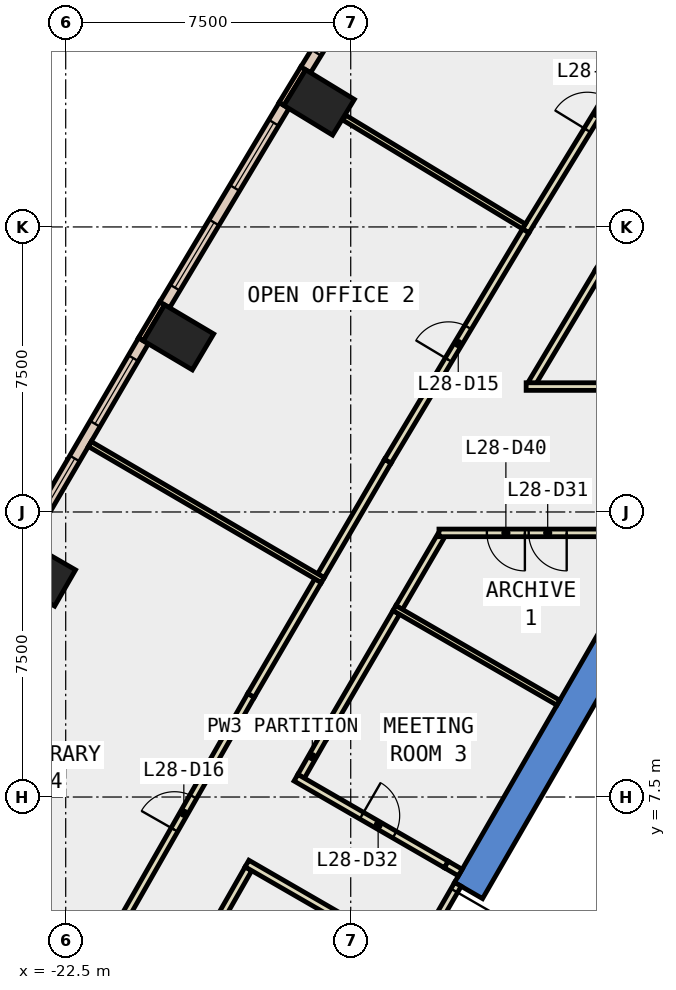
"""IFC4 building model, lengths in metres.
Left out: names, types, materials, properties, quantities, classifications, styles, units other than length and angle.
Written with IfcOpenShell. Run it as: python <this file> out.ifc"""

import sys

from ifc_helpers import new_model, si_unit, direction, frame, frame_2d, origin, origin_2d, place, context, subcontext, project, spatial, polyline, rectangle, outline, extrude, element, fill, save


model = new_model("IFC4")
c1 = context("Model", 3, precision=1e-05, world=origin(), true_north=direction((0.0, 1.0)))
c2 = subcontext(c1, "Body", "Model", "MODEL_VIEW")
j1 = project(units=[si_unit("LENGTHUNIT", "METRE"), si_unit("PLANEANGLEUNIT", "RADIAN")], contexts=[c1])
p1 = place(None, origin())
s1 = spatial("IfcSite", under=j1, at=p1, CompositionType="ELEMENT")
p2 = place(p1, origin())
s2 = spatial("IfcBuilding", under=s1, at=p2, CompositionType="ELEMENT")
p3 = place(p2, frame((0.0, 0.0, 128.6)))
s3 = spatial("IfcBuildingStorey", under=s2, at=p3, CompositionType="ELEMENT", Elevation=128.6)
for number, where, z_axis, x_axis in (
    (1, (-15.831, 25.776, -0.4), (0.0, 0.0, 1.0), (0.52, 0.854, 0.0)),
    (2, (-19.532, 19.595, -0.4), (0.0, 0.0, 1.0), (0.51, 0.86, 0.0)),
    (3, (-23.166, 13.375, -0.4), (0.0, 0.0, 1.0), (0.5, 0.866, 0.0)),
):
    element("IfcColumn", number, at=place(p3, frame(where, z_axis=z_axis, x_axis=x_axis)), inside=s3, PredefinedType="COLUMN", context=c2, shape_type="SweptSolid", body=[
        extrude(rectangle(XDim=1.1, YDim=1.5, at=origin_2d()), origin(), (0.0, 0.0, 1.0), 4.0),
    ])
p4 = place(p3, frame((0.0, 0.0, -0.4)))
e4 = element("IfcWall", 4, at=p4, inside=s3, PredefinedType="SHEAR", context=c2, shape_type="SweptSolid", body=[
    extrude(outline(polyline([(-12.267, 5.252), (-11.531, 4.827), (-6.437, 13.65), (-6.928, 14.5), (-12.267, 5.252)])), origin(), (0.0, 0.0, 1.0), 4.0),
])
p5 = place(p3, frame((-16.25, 26.675, 0.0), z_axis=(0.0, 0.0, 1.0), x_axis=(-0.519869515594, -0.854245682901, 0.0)))
e5 = element("IfcWall", 5, at=p5, inside=s3, PredefinedType="STANDARD", context=c2, shape_type="SweptSolid", body=[
    extrude(rectangle(XDim=1.1, YDim=0.15, at=frame_2d((0.55, 0.0))), origin(), (0.0, 0.0, 1.0), 3.6),
])
p6 = place(p3, frame((-19.961, 20.489, 0.0), z_axis=(0.0, 0.0, 1.0), x_axis=(-0.510082245696, -0.860125631885, 0.0)))
e6 = element("IfcWall", 6, at=p6, inside=s3, PredefinedType="STANDARD", context=c2, shape_type="SweptSolid", body=[
    extrude(rectangle(XDim=1.1, YDim=0.15, at=frame_2d((0.55, 0.0))), origin(), (0.0, 0.0, 1.0), 3.6),
])
p7 = place(p3, frame((-12.989, 31.846, 0.0), z_axis=(0.0, 0.0, 1.0), x_axis=(-0.522757750181, -0.8524812811, 0.0)))
e7 = element("IfcWall", 7, at=p7, inside=s3, PredefinedType="STANDARD", context=c2, shape_type="SweptSolid", body=[
    extrude(rectangle(XDim=6.114, YDim=0.3, at=frame_2d((3.057, 0.0))), origin(), (0.0, 0.0, 1.0), 3.6),
])
p8 = place(p7, frame((0.528, 0.0, 0.9)))
e8 = element("IfcOpeningElement", 8, at=p8, cuts=e7, PredefinedType="OPENING", context=c2, shape_type="SweptSolid", body=[
    extrude(rectangle(XDim=2.0, YDim=2.6, at=frame_2d((1.0, 1.3))), frame((0.0, 0.16, 0.0), z_axis=(0.0, -1.0, 0.0), x_axis=(1.0, 0.0, 0.0)), (0.0, 0.0, 1.0), 0.32),
])
p9 = place(p7, frame((3.585, 0.0, 0.9)))
e9 = element("IfcOpeningElement", 9, at=p9, cuts=e7, PredefinedType="OPENING", context=c2, shape_type="SweptSolid", body=[
    extrude(rectangle(XDim=2.0, YDim=2.6, at=frame_2d((1.0, 1.3))), frame((0.0, 0.16, 0.0), z_axis=(0.0, -1.0, 0.0), x_axis=(1.0, 0.0, 0.0)), (0.0, 0.0, 1.0), 0.32),
])
p10 = place(p3, frame((-16.754, 25.695, 0.0), z_axis=(0.0, 0.0, 1.0), x_axis=(-0.513708729904, -0.857964650099, 0.0)))
e10 = element("IfcWall", 10, at=p10, inside=s3, PredefinedType="STANDARD", context=c2, shape_type="SweptSolid", body=[
    extrude(rectangle(XDim=6.115, YDim=0.3, at=frame_2d((3.057, 0.0))), origin(), (0.0, 0.0, 1.0), 3.6),
])
p11 = place(p10, frame((0.529, 0.0, 0.9)))
e11 = element("IfcOpeningElement", 11, at=p11, cuts=e10, PredefinedType="OPENING", context=c2, shape_type="SweptSolid", body=[
    extrude(rectangle(XDim=2.0, YDim=2.6, at=frame_2d((1.0, 1.3))), frame((0.0, 0.16, 0.0), z_axis=(0.0, -1.0, 0.0), x_axis=(1.0, 0.0, 0.0)), (0.0, 0.0, 1.0), 0.32),
])
p12 = place(p10, frame((3.586, 0.0, 0.9)))
e12 = element("IfcOpeningElement", 12, at=p12, cuts=e10, PredefinedType="OPENING", context=c2, shape_type="SweptSolid", body=[
    extrude(rectangle(XDim=2.0, YDim=2.6, at=frame_2d((1.0, 1.3))), frame((0.0, 0.16, 0.0), z_axis=(0.0, -1.0, 0.0), x_axis=(1.0, 0.0, 0.0)), (0.0, 0.0, 1.0), 0.32),
])
p13 = place(p3, frame((-20.454, 19.503, 0.0), z_axis=(0.0, 0.0, 1.0), x_axis=(-0.504441987427, -0.863445586775, 0.0)))
e13 = element("IfcWall", 13, at=p13, inside=s3, PredefinedType="STANDARD", context=c2, shape_type="SweptSolid", body=[
    extrude(rectangle(XDim=6.114, YDim=0.3, at=frame_2d((3.057, 0.0))), origin(), (0.0, 0.0, 1.0), 3.6),
])
p14 = place(p13, frame((0.528, 0.0, 0.9)))
e14 = element("IfcOpeningElement", 14, at=p14, cuts=e13, PredefinedType="OPENING", context=c2, shape_type="SweptSolid", body=[
    extrude(rectangle(XDim=2.0, YDim=2.6, at=frame_2d((1.0, 1.3))), frame((0.0, 0.16, 0.0), z_axis=(0.0, -1.0, 0.0), x_axis=(1.0, 0.0, 0.0)), (0.0, 0.0, 1.0), 0.32),
])
p15 = place(p13, frame((3.585, 0.0, 0.9)))
e15 = element("IfcOpeningElement", 15, at=p15, cuts=e13, PredefinedType="OPENING", context=c2, shape_type="SweptSolid", body=[
    extrude(rectangle(XDim=2.0, YDim=2.6, at=frame_2d((1.0, 1.3))), frame((0.0, 0.16, 0.0), z_axis=(0.0, -1.0, 0.0), x_axis=(1.0, 0.0, 0.0)), (0.0, 0.0, 1.0), 0.32),
])
p16 = place(p3, frame((-12.628, 14.364, 0.0), z_axis=(0.0, 0.0, 1.0), x_axis=(-0.504457175129, -0.863436713639, 0.0)))
e16 = element("IfcWall", 16, at=p16, inside=s3, PredefinedType="PARTITIONING", context=c2, shape_type="SweptSolid", body=[
    extrude(rectangle(XDim=2.175, YDim=0.2, at=frame_2d((1.087, 0.0))), origin(), (0.0, 0.0, 1.0), 3.6),
])
p17 = place(p3, frame((-13.801, 12.356, 0.0), z_axis=(0.0, 0.0, 1.0), x_axis=(-0.504282474222, -0.863538757782, 0.0)))
e17 = element("IfcWall", 17, at=p17, inside=s3, PredefinedType="PARTITIONING", context=c2, shape_type="SweptSolid", body=[
    extrude(rectangle(XDim=3.8, YDim=0.2, at=frame_2d((1.9, 0.0))), origin(), (0.0, 0.0, 1.0), 3.6),
])
p18 = place(p3, frame((-15.717, 9.075, 0.0), z_axis=(0.0, 0.0, 1.0), x_axis=(-0.495695496657, -0.868496387208, 0.0)))
e18 = element("IfcWall", 18, at=p18, inside=s3, PredefinedType="PARTITIONING", context=c2, shape_type="SweptSolid", body=[
    extrude(rectangle(XDim=1.186, YDim=0.2, at=frame_2d((0.593, 0.0))), origin(), (0.0, 0.0, 1.0), 3.6),
])
p19 = place(p3, frame((-16.441, 8.008, 0.0), z_axis=(0.0, 0.0, 1.0), x_axis=(0.866020923391, -0.500007760188, 0.0)))
e19 = element("IfcWall", 19, at=p19, inside=s3, PredefinedType="PARTITIONING", context=c2, shape_type="SweptSolid", body=[
    extrude(rectangle(XDim=4.568, YDim=0.2, at=frame_2d((2.284, 0.0))), origin(), (0.0, 0.0, 1.0), 3.6),
])
p20 = place(p19, frame((1.997, 0.0, 0.0)))
e20 = element("IfcOpeningElement", 20, at=p20, cuts=e19, PredefinedType="OPENING", context=c2, shape_type="SweptSolid", body=[
    extrude(rectangle(XDim=1.0, YDim=2.1, at=frame_2d((0.5, 1.05))), frame((0.0, 0.11, 0.0), z_axis=(0.0, -1.0, 0.0), x_axis=(1.0, 0.0, 0.0)), (0.0, 0.0, 1.0), 0.22),
])
p21 = place(p3, frame((-4.756, 27.386, 0.0), z_axis=(0.0, 0.0, 1.0), x_axis=(-0.522743103274, -0.852490262689, 0.0)))
e21 = element("IfcWall", 21, at=p21, inside=s3, PredefinedType="PARTITIONING", context=c2, shape_type="SweptSolid", body=[
    extrude(rectangle(XDim=7.115, YDim=0.2, at=frame_2d((3.557, 0.0))), origin(), (0.0, 0.0, 1.0), 3.6),
])
p22 = place(p21, frame((3.057, 0.0, 0.0)))
e22 = element("IfcOpeningElement", 22, at=p22, cuts=e21, PredefinedType="OPENING", context=c2, shape_type="SweptSolid", body=[
    extrude(rectangle(XDim=1.0, YDim=2.1, at=frame_2d((0.5, 1.05))), frame((0.0, 0.11, 0.0), z_axis=(0.0, -1.0, 0.0), x_axis=(1.0, 0.0, 0.0)), (0.0, 0.0, 1.0), 0.22),
])
p23 = place(p3, frame((-8.475, 21.321, 0.0), z_axis=(0.0, 0.0, 1.0), x_axis=(-0.513592824646, -0.858034038062, 0.0)))
e23 = element("IfcWall", 23, at=p23, inside=s3, PredefinedType="PARTITIONING", context=c2, shape_type="SweptSolid", body=[
    extrude(rectangle(XDim=3.421, YDim=0.2, at=frame_2d((1.71, 0.0))), origin(), (0.0, 0.0, 1.0), 3.6),
])
p24 = place(p3, frame((-17.692, 5.613, 0.0), z_axis=(0.0, 0.0, 1.0), x_axis=(-0.495492055461, -0.868612469963, 0.0)))
e24 = element("IfcWall", 24, at=p24, inside=s3, PredefinedType="PARTITIONING", context=c2, shape_type="SweptSolid", body=[
    extrude(rectangle(XDim=3.13, YDim=0.2, at=frame_2d((1.565, 0.0))), origin(), (0.0, 0.0, 1.0), 3.6),
])
p25 = place(p3, frame((-10.396, 22.397, 0.0), z_axis=(0.0, 0.0, 1.0), x_axis=(0.522695398968, 0.852519512913, 0.0)))
e25 = element("IfcWall", 25, at=p25, inside=s3, PredefinedType="PARTITIONING", context=c2, shape_type="SweptSolid", body=[
    extrude(rectangle(XDim=7.213, YDim=0.2, at=frame_2d((3.606, 0.0))), origin(), (0.0, 0.0, 1.0), 3.6),
])
p26 = place(p25, frame((3.106, 0.0, 0.0)))
e26 = element("IfcOpeningElement", 26, at=p26, cuts=e25, PredefinedType="OPENING", context=c2, shape_type="SweptSolid", body=[
    extrude(rectangle(XDim=1.0, YDim=2.1, at=frame_2d((0.5, 1.05))), frame((0.0, 0.11, 0.0), z_axis=(0.0, -1.0, 0.0), x_axis=(1.0, 0.0, 0.0)), (0.0, 0.0, 1.0), 0.22),
])
p27 = place(p3, frame((-15.784, 13.322, 0.0), z_axis=(0.0, 0.0, 1.0), x_axis=(0.50424043703, 0.863563304954, 0.0)))
e27 = element("IfcWall", 27, at=p27, inside=s3, PredefinedType="PARTITIONING", context=c2, shape_type="SweptSolid", body=[
    extrude(rectangle(XDim=3.492, YDim=0.2, at=frame_2d((1.746, 0.0))), origin(), (0.0, 0.0, 1.0), 3.6),
])
p28 = place(p3, frame((-14.023, 16.338, 0.0), z_axis=(0.0, 0.0, 1.0), x_axis=(0.513773581048, 0.857925816966, 0.0)))
e28 = element("IfcWall", 28, at=p28, inside=s3, PredefinedType="PARTITIONING", context=c2, shape_type="SweptSolid", body=[
    extrude(rectangle(XDim=7.061, YDim=0.2, at=frame_2d((3.531, 0.0))), origin(), (0.0, 0.0, 1.0), 3.6),
])
p29 = place(p28, frame((3.106, 0.0, 0.0)))
e29 = element("IfcOpeningElement", 29, at=p29, cuts=e28, PredefinedType="OPENING", context=c2, shape_type="SweptSolid", body=[
    extrude(rectangle(XDim=1.0, YDim=2.1, at=frame_2d((0.5, 1.05))), frame((0.0, 0.11, 0.0), z_axis=(0.0, -1.0, 0.0), x_axis=(1.0, 0.0, 0.0)), (0.0, 0.0, 1.0), 0.22),
])
p30 = place(p3, frame((-21.16, 3.974, 0.0), z_axis=(0.0, 0.0, 1.0), x_axis=(0.495450054309, 0.868636427791, 0.0)))
e30 = element("IfcWall", 30, at=p30, inside=s3, PredefinedType="PARTITIONING", context=c2, shape_type="SweptSolid", body=[
    extrude(rectangle(XDim=7.139, YDim=0.2, at=frame_2d((3.569, 0.0))), origin(), (0.0, 0.0, 1.0), 3.6),
])
p31 = place(p30, frame((3.069, 0.0, 0.0)))
e31 = element("IfcOpeningElement", 31, at=p31, cuts=e30, PredefinedType="OPENING", context=c2, shape_type="SweptSolid", body=[
    extrude(rectangle(XDim=1.0, YDim=2.1, at=frame_2d((0.5, 1.05))), frame((0.0, 0.11, 0.0), z_axis=(0.0, -1.0, 0.0), x_axis=(1.0, 0.0, 0.0)), (0.0, 0.0, 1.0), 0.22),
])
p32 = place(p3, frame((-17.623, 10.175, 0.0), z_axis=(0.0, 0.0, 1.0), x_axis=(0.504383407959, 0.863479807393, 0.0)))
e32 = element("IfcWall", 32, at=p32, inside=s3, PredefinedType="PARTITIONING", context=c2, shape_type="SweptSolid", body=[
    extrude(rectangle(XDim=3.495, YDim=0.2, at=frame_2d((1.748, 0.0))), origin(), (0.0, 0.0, 1.0), 3.6),
])
p33 = place(p3, frame((-9.537, 9.981, 0.0), z_axis=(0.0, 0.0, 1.0), x_axis=(-0.866035377451, 0.499982724704, 0.0)))
e33 = element("IfcWall", 33, at=p33, inside=s3, PredefinedType="PARTITIONING", context=c2, shape_type="SweptSolid", body=[
    extrude(rectangle(XDim=4.98, YDim=0.15, at=frame_2d((2.49, 0.0))), origin(), (0.0, 0.0, 1.0), 3.6),
])
p34 = place(p3, frame((-6.957, 14.45, 0.0), z_axis=(0.0, 0.0, 1.0), x_axis=(-1.0, 0.0, 0.0)))
e34 = element("IfcWall", 34, at=p34, inside=s3, PredefinedType="PARTITIONING", context=c2, shape_type="SweptSolid", body=[
    extrude(rectangle(XDim=5.721, YDim=0.2, at=frame_2d((2.86, 0.0))), origin(), (0.0, 0.0, 1.0), 3.6),
])
p35 = place(p34, frame((2.36, 0.0, 0.0)))
e35 = element("IfcOpeningElement", 35, at=p35, cuts=e34, PredefinedType="OPENING", context=c2, shape_type="SweptSolid", body=[
    extrude(rectangle(XDim=1.0, YDim=2.1, at=frame_2d((0.5, 1.05))), frame((0.0, 0.11, 0.0), z_axis=(0.0, -1.0, 0.0), x_axis=(1.0, 0.0, 0.0)), (0.0, 0.0, 1.0), 0.22),
])
p36 = place(p34, frame((3.46, 0.0, 0.0)))
e36 = element("IfcOpeningElement", 36, at=p36, cuts=e34, PredefinedType="OPENING", context=c2, shape_type="SweptSolid", body=[
    extrude(rectangle(XDim=1.0, YDim=2.1, at=frame_2d((0.5, 1.05))), frame((0.0, 0.11, 0.0), z_axis=(0.0, -1.0, 0.0), x_axis=(1.0, 0.0, 0.0)), (0.0, 0.0, 1.0), 0.22),
])
p37 = place(p3, frame((-10.384, 18.3, 0.0), z_axis=(0.0, 0.0, 1.0), x_axis=(1.0, 0.0, 0.0)))
e37 = element("IfcWall", 37, at=p37, inside=s3, PredefinedType="PARTITIONING", context=c2, shape_type="SweptSolid", body=[
    extrude(rectangle(XDim=9.984, YDim=0.2, at=frame_2d((4.992, 0.0))), origin(), (0.0, 0.0, 1.0), 3.6),
])
p38 = place(p3, frame((-10.442, 22.513, 0.0), z_axis=(0.0, 0.0, 1.0), x_axis=(-0.855343076014, 0.518061986943, 0.0)))
e38 = element("IfcWall", 38, at=p38, inside=s3, PredefinedType="PARTITIONING", context=c2, shape_type="SweptSolid", body=[
    extrude(rectangle(XDim=5.53, YDim=0.15, at=frame_2d((2.765, 0.0))), origin(), (0.0, 0.0, 1.0), 3.6),
])
p39 = place(p3, frame((-15.736, 13.207, 0.0), z_axis=(0.0, 0.0, 1.0), x_axis=(-0.863454426155, 0.504426856892, 0.0)))
e39 = element("IfcWall", 39, at=p39, inside=s3, PredefinedType="PARTITIONING", context=c2, shape_type="SweptSolid", body=[
    extrude(rectangle(XDim=7.099, YDim=0.15, at=frame_2d((3.55, 0.0))), origin(), (0.0, 0.0, 1.0), 3.6),
])
p40 = place(p3, frame((-12.18, 5.202, 0.0), z_axis=(0.0, 0.0, 1.0), x_axis=(-0.50002537861, -0.866010750942, 0.0)))
e40 = element("IfcWall", 40, at=p40, inside=s3, PredefinedType="PARTITIONING", context=c2, shape_type="SweptSolid", body=[
    extrude(rectangle(XDim=2.0, YDim=0.2, at=frame_2d((1.0, 0.0))), origin(), (0.0, 0.0, 1.0), 2.4),
])
p41 = place(p40, frame((0.19, 0.0, 0.0)))
e41 = element("IfcOpeningElement", 41, at=p41, cuts=e40, PredefinedType="OPENING", context=c2, shape_type="SweptSolid", body=[
    extrude(rectangle(XDim=1.8, YDim=2.1, at=frame_2d((0.9, 1.05))), frame((0.0, 0.11, 0.0), z_axis=(0.0, -1.0, 0.0), x_axis=(1.0, 0.0, 0.0)), (0.0, 0.0, 1.0), 0.22),
])
p42 = place(p3, frame((-12.485, 5.724, 0.0), z_axis=(0.0, 0.0, 1.0), x_axis=(0.866434177787, -0.499291313327, 0.0)))
e42 = element("IfcWall", 42, at=p42, inside=s3, PredefinedType="PARTITIONING", context=c2, shape_type="SweptSolid", body=[
    extrude(rectangle(XDim=0.425, YDim=0.2, at=frame_2d((0.212, 0.0))), origin(), (0.0, 0.0, 1.0), 2.4),
])
p43 = place(p3, frame((-13.785, 3.473, 0.0), z_axis=(0.0, 0.0, 1.0), x_axis=(-0.866081168121, 0.499903400895, 0.0)))
e43 = element("IfcWall", 43, at=p43, inside=s3, PredefinedType="PARTITIONING", context=c2, shape_type="SweptSolid", body=[
    extrude(rectangle(XDim=4.555, YDim=0.2, at=frame_2d((2.278, 0.0))), origin(), (0.0, 0.0, 1.0), 3.6),
])
p44 = place(p3, frame((-5.03, 9.388, 0.0), z_axis=(0.0, 0.0, 1.0), x_axis=(-0.499978703459, -0.866037698999, 0.0)))
e44 = element("IfcWall", 44, at=p44, inside=s3, PredefinedType="STANDARD", context=c2, shape_type="SweptSolid", body=[
    extrude(rectangle(XDim=6.9, YDim=0.2, at=frame_2d((3.45, 0.0))), origin(), (0.0, 0.0, 1.0), 3.6),
])
p45 = place(p9, origin())
e45 = element("IfcWindow", 45, at=p45, inside=s3, PartitioningType="SINGLE_PANEL", PredefinedType="WINDOW", context=c2, shape_type="SweptSolid", body=[
    extrude(rectangle(XDim=2.0, YDim=2.6, at=frame_2d((1.0, 1.3))), frame((0.0, 0.03, 0.0), z_axis=(0.0, -1.0, 0.0), x_axis=(1.0, 0.0, 0.0)), (0.0, 0.0, 1.0), 0.06),
])
fill(e9, e45)
p46 = place(p11, origin())
e46 = element("IfcWindow", 46, at=p46, inside=s3, PartitioningType="SINGLE_PANEL", PredefinedType="WINDOW", context=c2, shape_type="SweptSolid", body=[
    extrude(rectangle(XDim=2.0, YDim=2.6, at=frame_2d((1.0, 1.3))), frame((0.0, 0.03, 0.0), z_axis=(0.0, -1.0, 0.0), x_axis=(1.0, 0.0, 0.0)), (0.0, 0.0, 1.0), 0.06),
])
fill(e11, e46)
p47 = place(p12, origin())
e47 = element("IfcWindow", 47, at=p47, inside=s3, PartitioningType="SINGLE_PANEL", PredefinedType="WINDOW", context=c2, shape_type="SweptSolid", body=[
    extrude(rectangle(XDim=2.0, YDim=2.6, at=frame_2d((1.0, 1.3))), frame((0.0, 0.03, 0.0), z_axis=(0.0, -1.0, 0.0), x_axis=(1.0, 0.0, 0.0)), (0.0, 0.0, 1.0), 0.06),
])
fill(e12, e47)
p48 = place(p14, origin())
e48 = element("IfcWindow", 48, at=p48, inside=s3, PartitioningType="SINGLE_PANEL", PredefinedType="WINDOW", context=c2, shape_type="SweptSolid", body=[
    extrude(rectangle(XDim=2.0, YDim=2.6, at=frame_2d((1.0, 1.3))), frame((0.0, 0.03, 0.0), z_axis=(0.0, -1.0, 0.0), x_axis=(1.0, 0.0, 0.0)), (0.0, 0.0, 1.0), 0.06),
])
fill(e14, e48)
p49 = place(p15, origin())
e49 = element("IfcWindow", 49, at=p49, inside=s3, PartitioningType="SINGLE_PANEL", PredefinedType="WINDOW", context=c2, shape_type="SweptSolid", body=[
    extrude(rectangle(XDim=2.0, YDim=2.6, at=frame_2d((1.0, 1.3))), frame((0.0, 0.03, 0.0), z_axis=(0.0, -1.0, 0.0), x_axis=(1.0, 0.0, 0.0)), (0.0, 0.0, 1.0), 0.06),
])
fill(e15, e49)
p50 = place(p26, origin())
e50 = element("IfcDoor", 50, at=p50, inside=s3, OperationType="SINGLE_SWING_LEFT", PredefinedType="DOOR", context=c2, shape_type="SweptSolid", body=[
    extrude(rectangle(XDim=1.0, YDim=2.1, at=frame_2d((0.5, 1.05))), frame((0.0, 0.025, 0.0), z_axis=(0.0, -1.0, 0.0), x_axis=(1.0, 0.0, 0.0)), (0.0, 0.0, 1.0), 0.05),
])
fill(e26, e50)
p51 = place(p29, origin())
e51 = element("IfcDoor", 51, at=p51, inside=s3, OperationType="SINGLE_SWING_LEFT", PredefinedType="DOOR", context=c2, shape_type="SweptSolid", body=[
    extrude(rectangle(XDim=1.0, YDim=2.1, at=frame_2d((0.5, 1.05))), frame((0.0, 0.025, 0.0), z_axis=(0.0, -1.0, 0.0), x_axis=(1.0, 0.0, 0.0)), (0.0, 0.0, 1.0), 0.05),
])
fill(e29, e51)
p52 = place(p31, origin())
e52 = element("IfcDoor", 52, at=p52, inside=s3, OperationType="SINGLE_SWING_LEFT", PredefinedType="DOOR", context=c2, shape_type="SweptSolid", body=[
    extrude(rectangle(XDim=1.0, YDim=2.1, at=frame_2d((0.5, 1.05))), frame((0.0, 0.025, 0.0), z_axis=(0.0, -1.0, 0.0), x_axis=(1.0, 0.0, 0.0)), (0.0, 0.0, 1.0), 0.05),
])
fill(e31, e52)
p53 = place(p35, origin())
e53 = element("IfcDoor", 53, at=p53, inside=s3, OperationType="SINGLE_SWING_LEFT", PredefinedType="DOOR", context=c2, shape_type="SweptSolid", body=[
    extrude(rectangle(XDim=1.0, YDim=2.1, at=frame_2d((0.5, 1.05))), frame((0.0, 0.025, 0.0), z_axis=(0.0, -1.0, 0.0), x_axis=(1.0, 0.0, 0.0)), (0.0, 0.0, 1.0), 0.05),
])
fill(e35, e53)
p54 = place(p20, origin())
e54 = element("IfcDoor", 54, at=p54, inside=s3, OperationType="SINGLE_SWING_LEFT", PredefinedType="DOOR", context=c2, shape_type="SweptSolid", body=[
    extrude(rectangle(XDim=1.0, YDim=2.1, at=frame_2d((0.5, 1.05))), frame((0.0, 0.025, 0.0), z_axis=(0.0, -1.0, 0.0), x_axis=(1.0, 0.0, 0.0)), (0.0, 0.0, 1.0), 0.05),
])
fill(e20, e54)
p55 = place(p36, origin())
e55 = element("IfcDoor", 55, at=p55, inside=s3, OperationType="SINGLE_SWING_RIGHT", PredefinedType="DOOR", context=c2, shape_type="SweptSolid", body=[
    extrude(rectangle(XDim=1.0, YDim=2.1, at=frame_2d((0.5, 1.05))), frame((0.0, 0.025, 0.0), z_axis=(0.0, -1.0, 0.0), x_axis=(1.0, 0.0, 0.0)), (0.0, 0.0, 1.0), 0.05),
])
fill(e36, e55)
p56 = place(p41, origin())
e56 = element("IfcDoor", 56, at=p56, inside=s3, OperationType="DOUBLE_DOOR_SINGLE_SWING", PredefinedType="DOOR", context=c2, shape_type="SweptSolid", body=[
    extrude(rectangle(XDim=1.8, YDim=2.1, at=frame_2d((0.9, 1.05))), frame((0.0, 0.025, 0.0), z_axis=(0.0, -1.0, 0.0), x_axis=(1.0, 0.0, 0.0)), (0.0, 0.0, 1.0), 0.05),
])
fill(e41, e56)
save(model, sys.argv[1])
